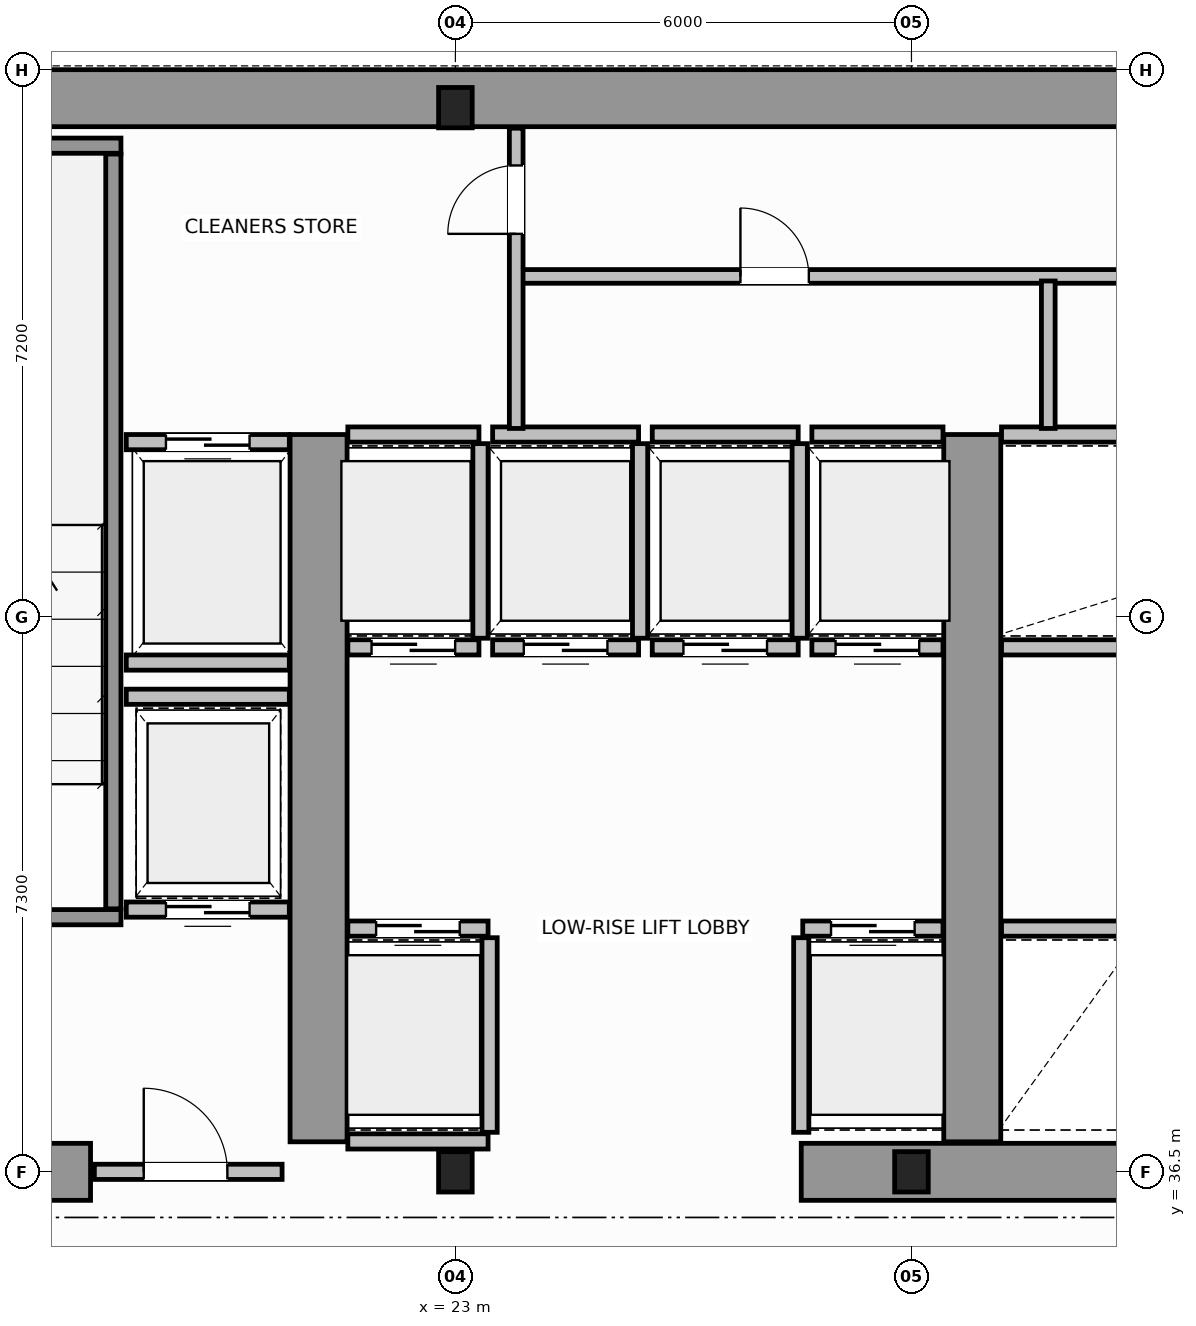
"""IFC4 building model, lengths in metres.
Left out: names, types, materials, properties, quantities, classifications, styles, units other than length and angle.
Written with IfcOpenShell. Run it as: python <this file> out.ifc"""

import sys

from ifc_helpers import new_model, si_unit, direction, frame, frame_2d, origin, origin_2d, place, context, subcontext, project, spatial, rectangle, i_section, extrude, source, transform, mapped, element, fill, save


model = new_model("IFC4")
c1 = context("Model", 3, precision=1e-05, world=origin(), true_north=direction((0.0, 1.0)))
c2 = subcontext(c1, "Body", "Model", "MODEL_VIEW")
j1 = project(units=[si_unit("LENGTHUNIT", "METRE"), si_unit("PLANEANGLEUNIT", "RADIAN")], contexts=[c1])
p1 = place(None, origin())
s1 = spatial("IfcSite", under=j1, at=p1, CompositionType="ELEMENT")
p2 = place(p1, origin())
s2 = spatial("IfcBuilding", under=s1, at=p2, CompositionType="ELEMENT")
p3 = place(p2, frame((0.0, 0.0, 92.0)))
s3 = spatial("IfcBuildingStorey", under=s2, at=p3, CompositionType="ELEMENT", Elevation=92.0)
m1 = source(origin(), c2, "Body", "SweptSolid", [
    extrude(i_section(OverallWidth=0.442, OverallDepth=0.531, WebThickness=0.065, FlangeThickness=0.076, FilletRadius=0.015, at=origin_2d()), origin(), (0.0, 0.0, 1.0), 3.8),
])
for number, where, z_axis, x_axis in (
    (1, (23.0, 36.5, 0.0), (0.0, 0.0, 1.0), (1.0, 0.0, 0.0)),
    (2, (29.0, 36.5, 0.0), (0.0, 0.0, 1.0), (1.0, 0.0, 0.0)),
    (3, (23.0, 50.5, 0.0), (0.0, 0.0, 1.0), (1.0, 0.0, 0.0)),
):
    element("IfcColumn", number, at=place(p3, frame(where, z_axis=z_axis, x_axis=x_axis)), inside=s3, PredefinedType="COLUMN", context=c2, shape_type="MappedRepresentation", body=[
        mapped(m1, transform((0.0, 0.0, 0.0), scale=1.0)),
    ])
p4 = place(p3, frame((14.379, 50.625, 0.0), z_axis=(0.0, 0.0, 1.0), x_axis=(1.0, 0.0, 0.0)))
e4 = element("IfcWall", 4, at=p4, inside=s3, PredefinedType="SHEAR", context=c2, shape_type="SweptSolid", body=[
    extrude(rectangle(XDim=19.619, YDim=0.75, at=frame_2d((9.81, 0.0))), origin(), (0.0, 0.0, 1.0), 3.8),
])
p5 = place(p3, frame((14.395, 36.5, 0.0), z_axis=(0.0, 0.0, 1.0), x_axis=(1.0, 0.0, 0.0)))
e5 = element("IfcWall", 5, at=p5, inside=s3, PredefinedType="SHEAR", context=c2, shape_type="SweptSolid", body=[
    extrude(rectangle(XDim=3.805, YDim=0.75, at=frame_2d((1.902, 0.0))), origin(), (0.0, 0.0, 1.0), 2.38),
])
p6 = place(p3, frame((27.55, 36.5, 0.0), z_axis=(0.0, 0.0, 1.0), x_axis=(1.0, 0.0, 0.0)))
e6 = element("IfcWall", 6, at=p6, inside=s3, PredefinedType="SHEAR", context=c2, shape_type="SweptSolid", body=[
    extrude(rectangle(XDim=4.5, YDim=0.75, at=frame_2d((2.25, 0.0))), origin(), (0.0, 0.0, 1.0), 3.8),
])
for number, where, z_axis, x_axis in (
    (7, (21.2, 36.895, 0.0), (0.0, 0.0, 1.0), (0.0, 1.0, 0.0)),
    (8, (29.8, 36.895, 0.0), (0.0, 0.0, 1.0), (0.0, 1.0, 0.0)),
):
    element("IfcWall", number, at=place(p3, frame(where, z_axis=z_axis, x_axis=x_axis)), inside=s3, PredefinedType="SHEAR", context=c2, shape_type="SweptSolid", body=[
        extrude(rectangle(XDim=9.305, YDim=0.75, at=frame_2d((4.652, 0.0))), origin(), (0.0, 0.0, 1.0), 3.8),
    ])
p7 = place(p3, frame((14.375, 39.85, 0.0), z_axis=(0.0, 0.0, 1.0), x_axis=(1.0, 0.0, 0.0)))
e9 = element("IfcWall", 9, at=p7, inside=s3, PredefinedType="SOLIDWALL", context=c2, shape_type="SweptSolid", body=[
    extrude(rectangle(XDim=4.225, YDim=0.2, at=frame_2d((2.113, 0.0))), origin(), (0.0, 0.0, 1.0), 3.8),
])
p8 = place(p7, frame((1.8, 0.0, 0.0)))
e10 = element("IfcOpeningElement", 10, at=p8, cuts=e9, PredefinedType="OPENING", context=c2, shape_type="SweptSolid", body=[
    extrude(rectangle(XDim=1.1, YDim=2.15, at=frame_2d((0.55, 1.075))), frame((0.0, 0.11, 0.0), z_axis=(0.0, -1.0, 0.0), x_axis=(1.0, 0.0, 0.0)), (0.0, 0.0, 1.0), 0.22),
])
p9 = place(p3, frame((14.375, 50.0, 0.0), z_axis=(0.0, 0.0, 1.0), x_axis=(1.0, 0.0, 0.0)))
e11 = element("IfcWall", 11, at=p9, inside=s3, PredefinedType="SOLIDWALL", context=c2, shape_type="SweptSolid", body=[
    extrude(rectangle(XDim=4.225, YDim=0.2, at=frame_2d((2.113, 0.0))), origin(), (0.0, 0.0, 1.0), 3.8),
])
p10 = place(p3, frame((18.5, 39.96, 0.0), z_axis=(0.0, 0.0, 1.0), x_axis=(0.0, 1.0, 0.0)))
e12 = element("IfcWall", 12, at=p10, inside=s3, PredefinedType="SOLIDWALL", context=c2, shape_type="SweptSolid", body=[
    extrude(rectangle(XDim=9.93, YDim=0.2, at=frame_2d((4.965, 0.0))), origin(), (0.0, 0.0, 1.0), 3.8),
])
p11 = place(p3, frame((18.25, 36.5, 0.0), z_axis=(0.0, 0.0, 1.0), x_axis=(1.0, 0.0, 0.0)))
e13 = element("IfcWall", 13, at=p11, inside=s3, PredefinedType="SOLIDWALL", context=c2, shape_type="SweptSolid", body=[
    extrude(rectangle(XDim=2.47, YDim=0.2, at=frame_2d((1.235, 0.0))), origin(), (0.0, 0.0, 1.0), 2.37),
])
p12 = place(p11, frame((0.65, 0.0, 0.0)))
e14 = element("IfcOpeningElement", 14, at=p12, cuts=e13, PredefinedType="OPENING", context=c2, shape_type="SweptSolid", body=[
    extrude(rectangle(XDim=1.1, YDim=2.15, at=frame_2d((0.55, 1.075))), frame((0.0, 0.11, 0.0), z_axis=(0.0, -1.0, 0.0), x_axis=(1.0, 0.0, 0.0)), (0.0, 0.0, 1.0), 0.22),
])
p13 = place(p3, frame((21.585, 39.7, 0.0), z_axis=(0.0, 0.0, 1.0), x_axis=(1.0, 0.0, 0.0)))
e15 = element("IfcWall", 15, at=p13, inside=s3, PredefinedType="SOLIDWALL", context=c2, shape_type="SweptSolid", body=[
    extrude(rectangle(XDim=1.845, YDim=0.2, at=frame_2d((0.922, 0.0))), origin(), (0.0, 0.0, 1.0), 3.58),
])
p14 = place(p13, frame((0.372, 0.0, 0.0)))
e16 = element("IfcOpeningElement", 16, at=p14, cuts=e15, PredefinedType="OPENING", context=c2, shape_type="SweptSolid", body=[
    extrude(rectangle(XDim=1.1, YDim=2.15, at=frame_2d((0.55, 1.075))), frame((0.0, 0.11, 0.0), z_axis=(0.0, -1.0, 0.0), x_axis=(1.0, 0.0, 0.0)), (0.0, 0.0, 1.0), 0.22),
])
p15 = place(p3, frame((21.585, 36.9, 0.0), z_axis=(0.0, 0.0, 1.0), x_axis=(1.0, 0.0, 0.0)))
e17 = element("IfcWall", 17, at=p15, inside=s3, PredefinedType="SOLIDWALL", context=c2, shape_type="SweptSolid", body=[
    extrude(rectangle(XDim=1.845, YDim=0.2, at=frame_2d((0.922, 0.0))), origin(), (0.0, 0.0, 1.0), 2.37),
])
p16 = place(p3, frame((23.45, 37.02, 0.0), z_axis=(0.0, 0.0, 1.0), x_axis=(0.0, 1.0, 0.0)))
e18 = element("IfcWall", 18, at=p16, inside=s3, PredefinedType="SOLIDWALL", context=c2, shape_type="SweptSolid", body=[
    extrude(rectangle(XDim=2.56, YDim=0.2, at=frame_2d((1.28, 0.0))), origin(), (0.0, 0.0, 1.0), 3.58),
])
p17 = place(p3, frame((27.57, 39.7, 0.0), z_axis=(0.0, 0.0, 1.0), x_axis=(1.0, 0.0, 0.0)))
e19 = element("IfcWall", 19, at=p17, inside=s3, PredefinedType="SOLIDWALL", context=c2, shape_type="SweptSolid", body=[
    extrude(rectangle(XDim=1.845, YDim=0.2, at=frame_2d((0.922, 0.0))), origin(), (0.0, 0.0, 1.0), 3.58),
])
p18 = place(p17, frame((0.372, 0.0, 0.0)))
e20 = element("IfcOpeningElement", 20, at=p18, cuts=e19, PredefinedType="OPENING", context=c2, shape_type="SweptSolid", body=[
    extrude(rectangle(XDim=1.1, YDim=2.15, at=frame_2d((0.55, 1.075))), frame((0.0, 0.11, 0.0), z_axis=(0.0, -1.0, 0.0), x_axis=(1.0, 0.0, 0.0)), (0.0, 0.0, 1.0), 0.22),
])
p19 = place(p3, frame((27.55, 37.02, 0.0), z_axis=(0.0, 0.0, 1.0), x_axis=(0.0, 1.0, 0.0)))
e21 = element("IfcWall", 21, at=p19, inside=s3, PredefinedType="SOLIDWALL", context=c2, shape_type="SweptSolid", body=[
    extrude(rectangle(XDim=2.56, YDim=0.2, at=frame_2d((1.28, 0.0))), origin(), (0.0, 0.0, 1.0), 3.58),
])
p20 = place(p3, frame((21.585, 43.4, 0.0), z_axis=(0.0, 0.0, 1.0), x_axis=(1.0, 0.0, 0.0)))
e22 = element("IfcWall", 22, at=p20, inside=s3, PredefinedType="SOLIDWALL", context=c2, shape_type="SweptSolid", body=[
    extrude(rectangle(XDim=1.725, YDim=0.2, at=frame_2d((0.863, 0.0))), origin(), (0.0, 0.0, 1.0), 3.58),
])
p21 = place(p20, frame((0.312, 0.0, 0.0)))
e23 = element("IfcOpeningElement", 23, at=p21, cuts=e22, PredefinedType="OPENING", context=c2, shape_type="SweptSolid", body=[
    extrude(rectangle(XDim=1.1, YDim=2.15, at=frame_2d((0.55, 1.075))), frame((0.0, 0.11, 0.0), z_axis=(0.0, -1.0, 0.0), x_axis=(1.0, 0.0, 0.0)), (0.0, 0.0, 1.0), 0.22),
])
p22 = place(p3, frame((21.585, 46.2, 0.0), z_axis=(0.0, 0.0, 1.0), x_axis=(1.0, 0.0, 0.0)))
e24 = element("IfcWall", 24, at=p22, inside=s3, PredefinedType="SOLIDWALL", context=c2, shape_type="SweptSolid", body=[
    extrude(rectangle(XDim=1.725, YDim=0.2, at=frame_2d((0.863, 0.0))), origin(), (0.0, 0.0, 1.0), 3.58),
])
p23 = place(p3, frame((23.33, 43.52, 0.0), z_axis=(0.0, 0.0, 1.0), x_axis=(0.0, 1.0, 0.0)))
e25 = element("IfcWall", 25, at=p23, inside=s3, PredefinedType="SOLIDWALL", context=c2, shape_type="SweptSolid", body=[
    extrude(rectangle(XDim=2.56, YDim=0.2, at=frame_2d((1.28, 0.0))), origin(), (0.0, 0.0, 1.0), 3.58),
])
p24 = place(p3, frame((23.49, 43.4, 0.0), z_axis=(0.0, 0.0, 1.0), x_axis=(1.0, 0.0, 0.0)))
e26 = element("IfcWall", 26, at=p24, inside=s3, PredefinedType="SOLIDWALL", context=c2, shape_type="SweptSolid", body=[
    extrude(rectangle(XDim=1.92, YDim=0.2, at=frame_2d((0.96, 0.0))), origin(), (0.0, 0.0, 1.0), 3.58),
])
p25 = place(p24, frame((0.41, 0.0, 0.0)))
e27 = element("IfcOpeningElement", 27, at=p25, cuts=e26, PredefinedType="OPENING", context=c2, shape_type="SweptSolid", body=[
    extrude(rectangle(XDim=1.1, YDim=2.15, at=frame_2d((0.55, 1.075))), frame((0.0, 0.11, 0.0), z_axis=(0.0, -1.0, 0.0), x_axis=(1.0, 0.0, 0.0)), (0.0, 0.0, 1.0), 0.22),
])
p26 = place(p3, frame((23.49, 46.2, 0.0), z_axis=(0.0, 0.0, 1.0), x_axis=(1.0, 0.0, 0.0)))
e28 = element("IfcWall", 28, at=p26, inside=s3, PredefinedType="SOLIDWALL", context=c2, shape_type="SweptSolid", body=[
    extrude(rectangle(XDim=1.92, YDim=0.2, at=frame_2d((0.96, 0.0))), origin(), (0.0, 0.0, 1.0), 3.58),
])
p27 = place(p3, frame((25.43, 43.52, 0.0), z_axis=(0.0, 0.0, 1.0), x_axis=(0.0, 1.0, 0.0)))
e29 = element("IfcWall", 29, at=p27, inside=s3, PredefinedType="SOLIDWALL", context=c2, shape_type="SweptSolid", body=[
    extrude(rectangle(XDim=2.56, YDim=0.2, at=frame_2d((1.28, 0.0))), origin(), (0.0, 0.0, 1.0), 3.58),
])
p28 = place(p3, frame((25.59, 43.4, 0.0), z_axis=(0.0, 0.0, 1.0), x_axis=(1.0, 0.0, 0.0)))
e30 = element("IfcWall", 30, at=p28, inside=s3, PredefinedType="SOLIDWALL", context=c2, shape_type="SweptSolid", body=[
    extrude(rectangle(XDim=1.92, YDim=0.2, at=frame_2d((0.96, 0.0))), origin(), (0.0, 0.0, 1.0), 3.58),
])
p29 = place(p28, frame((0.41, 0.0, 0.0)))
e31 = element("IfcOpeningElement", 31, at=p29, cuts=e30, PredefinedType="OPENING", context=c2, shape_type="SweptSolid", body=[
    extrude(rectangle(XDim=1.1, YDim=2.15, at=frame_2d((0.55, 1.075))), frame((0.0, 0.11, 0.0), z_axis=(0.0, -1.0, 0.0), x_axis=(1.0, 0.0, 0.0)), (0.0, 0.0, 1.0), 0.22),
])
p30 = place(p3, frame((25.59, 46.2, 0.0), z_axis=(0.0, 0.0, 1.0), x_axis=(1.0, 0.0, 0.0)))
e32 = element("IfcWall", 32, at=p30, inside=s3, PredefinedType="SOLIDWALL", context=c2, shape_type="SweptSolid", body=[
    extrude(rectangle(XDim=1.92, YDim=0.2, at=frame_2d((0.96, 0.0))), origin(), (0.0, 0.0, 1.0), 3.58),
])
p31 = place(p3, frame((27.53, 43.52, 0.0), z_axis=(0.0, 0.0, 1.0), x_axis=(0.0, 1.0, 0.0)))
e33 = element("IfcWall", 33, at=p31, inside=s3, PredefinedType="SOLIDWALL", context=c2, shape_type="SweptSolid", body=[
    extrude(rectangle(XDim=2.56, YDim=0.2, at=frame_2d((1.28, 0.0))), origin(), (0.0, 0.0, 1.0), 3.58),
])
p32 = place(p3, frame((27.69, 43.4, 0.0), z_axis=(0.0, 0.0, 1.0), x_axis=(1.0, 0.0, 0.0)))
e34 = element("IfcWall", 34, at=p32, inside=s3, PredefinedType="SOLIDWALL", context=c2, shape_type="SweptSolid", body=[
    extrude(rectangle(XDim=1.725, YDim=0.2, at=frame_2d((0.863, 0.0))), origin(), (0.0, 0.0, 1.0), 3.58),
])
p33 = place(p32, frame((0.312, 0.0, 0.0)))
e35 = element("IfcOpeningElement", 35, at=p33, cuts=e34, PredefinedType="OPENING", context=c2, shape_type="SweptSolid", body=[
    extrude(rectangle(XDim=1.1, YDim=2.15, at=frame_2d((0.55, 1.075))), frame((0.0, 0.11, 0.0), z_axis=(0.0, -1.0, 0.0), x_axis=(1.0, 0.0, 0.0)), (0.0, 0.0, 1.0), 0.22),
])
p34 = place(p3, frame((27.69, 46.2, 0.0), z_axis=(0.0, 0.0, 1.0), x_axis=(1.0, 0.0, 0.0)))
e36 = element("IfcWall", 36, at=p34, inside=s3, PredefinedType="SOLIDWALL", context=c2, shape_type="SweptSolid", body=[
    extrude(rectangle(XDim=1.725, YDim=0.2, at=frame_2d((0.863, 0.0))), origin(), (0.0, 0.0, 1.0), 3.58),
])
p35 = place(p3, frame((30.185, 39.7, 0.0), z_axis=(0.0, 0.0, 1.0), x_axis=(1.0, 0.0, 0.0)))
e37 = element("IfcWall", 37, at=p35, inside=s3, PredefinedType="SOLIDWALL", context=c2, shape_type="SweptSolid", body=[
    extrude(rectangle(XDim=1.845, YDim=0.2, at=frame_2d((0.922, 0.0))), origin(), (0.0, 0.0, 1.0), 3.58),
])
for number, where, z_axis, x_axis in (
    (38, (30.185, 43.4, 0.0), (0.0, 0.0, 1.0), (1.0, 0.0, 0.0)),
    (39, (30.185, 46.2, 0.0), (0.0, 0.0, 1.0), (1.0, 0.0, 0.0)),
):
    element("IfcWall", number, at=place(p3, frame(where, z_axis=z_axis, x_axis=x_axis)), inside=s3, PredefinedType="SOLIDWALL", context=c2, shape_type="SweptSolid", body=[
        extrude(rectangle(XDim=1.725, YDim=0.2, at=frame_2d((0.862, 0.0))), origin(), (0.0, 0.0, 1.0), 3.58),
    ])
p36 = place(p3, frame((18.67, 46.1, 0.0), z_axis=(0.0, 0.0, 1.0), x_axis=(1.0, 0.0, 0.0)))
e40 = element("IfcWall", 40, at=p36, inside=s3, PredefinedType="SOLIDWALL", context=c2, shape_type="SweptSolid", body=[
    extrude(rectangle(XDim=2.145, YDim=0.2, at=frame_2d((1.073, 0.0))), origin(), (0.0, 0.0, 1.0), 3.58),
])
p37 = place(p36, frame((0.522, 0.0, 0.0)))
e41 = element("IfcOpeningElement", 41, at=p37, cuts=e40, PredefinedType="OPENING", context=c2, shape_type="SweptSolid", body=[
    extrude(rectangle(XDim=1.1, YDim=2.15, at=frame_2d((0.55, 1.075))), frame((0.0, 0.11, 0.0), z_axis=(0.0, -1.0, 0.0), x_axis=(1.0, 0.0, 0.0)), (0.0, 0.0, 1.0), 0.22),
])
p38 = place(p3, frame((18.67, 43.2, 0.0), z_axis=(0.0, 0.0, 1.0), x_axis=(1.0, 0.0, 0.0)))
e42 = element("IfcWall", 42, at=p38, inside=s3, PredefinedType="SOLIDWALL", context=c2, shape_type="SweptSolid", body=[
    extrude(rectangle(XDim=2.145, YDim=0.2, at=frame_2d((1.073, 0.0))), origin(), (0.0, 0.0, 1.0), 3.58),
])
p39 = place(p3, frame((18.67, 39.95, 0.0), z_axis=(0.0, 0.0, 1.0), x_axis=(1.0, 0.0, 0.0)))
e43 = element("IfcWall", 43, at=p39, inside=s3, PredefinedType="SOLIDWALL", context=c2, shape_type="SweptSolid", body=[
    extrude(rectangle(XDim=2.145, YDim=0.2, at=frame_2d((1.073, 0.0))), origin(), (0.0, 0.0, 1.0), 3.58),
])
p40 = place(p39, frame((0.522, 0.0, 0.0)))
e44 = element("IfcOpeningElement", 44, at=p40, cuts=e43, PredefinedType="OPENING", context=c2, shape_type="SweptSolid", body=[
    extrude(rectangle(XDim=1.1, YDim=2.15, at=frame_2d((0.55, 1.075))), frame((0.0, 0.11, 0.0), z_axis=(0.0, -1.0, 0.0), x_axis=(1.0, 0.0, 0.0)), (0.0, 0.0, 1.0), 0.22),
])
p41 = place(p3, frame((18.67, 42.75, 0.0), z_axis=(0.0, 0.0, 1.0), x_axis=(1.0, 0.0, 0.0)))
e45 = element("IfcWall", 45, at=p41, inside=s3, PredefinedType="SOLIDWALL", context=c2, shape_type="SweptSolid", body=[
    extrude(rectangle(XDim=2.145, YDim=0.2, at=frame_2d((1.073, 0.0))), origin(), (0.0, 0.0, 1.0), 3.58),
])
p42 = place(p3, frame((23.85, 48.28, 0.0), z_axis=(0.0, 0.0, 1.0), x_axis=(1.0, 0.0, 0.0)))
e46 = element("IfcWall", 46, at=p42, inside=s3, PredefinedType="PLUMBINGWALL", context=c2, shape_type="SweptSolid", body=[
    extrude(rectangle(XDim=15.03, YDim=0.18, at=frame_2d((7.515, 0.0))), origin(), (0.0, 0.0, 1.0), 3.58),
])
p43 = place(p42, frame((2.9, 0.0, 0.0)))
e47 = element("IfcOpeningElement", 47, at=p43, cuts=e46, PredefinedType="OPENING", context=c2, shape_type="SweptSolid", body=[
    extrude(rectangle(XDim=0.9, YDim=2.15, at=frame_2d((0.45, 1.075))), frame((0.0, 0.1, 0.0), z_axis=(0.0, -1.0, 0.0), x_axis=(1.0, 0.0, 0.0)), (0.0, 0.0, 1.0), 0.2),
])
p44 = place(p42, frame((10.4, 0.0, 0.0)))
e48 = element("IfcOpeningElement", 48, at=p44, cuts=e46, PredefinedType="OPENING", context=c2, shape_type="SweptSolid", body=[
    extrude(rectangle(XDim=0.9, YDim=2.15, at=frame_2d((0.45, 1.075))), frame((0.0, 0.1, 0.0), z_axis=(0.0, -1.0, 0.0), x_axis=(1.0, 0.0, 0.0)), (0.0, 0.0, 1.0), 0.2),
])
p45 = place(p3, frame((23.8, 46.28, 0.0), z_axis=(0.0, 0.0, 1.0), x_axis=(0.0, 1.0, 0.0)))
e49 = element("IfcWall", 49, at=p45, inside=s3, PredefinedType="PLUMBINGWALL", context=c2, shape_type="SweptSolid", body=[
    extrude(rectangle(XDim=3.95, YDim=0.18, at=frame_2d((1.975, 0.0))), origin(), (0.0, 0.0, 1.0), 3.58),
])
p46 = place(p45, frame((2.56, 0.0, 0.0)))
e50 = element("IfcOpeningElement", 50, at=p46, cuts=e49, PredefinedType="OPENING", context=c2, shape_type="SweptSolid", body=[
    extrude(rectangle(XDim=0.9, YDim=2.15, at=frame_2d((0.45, 1.075))), frame((0.0, 0.1, 0.0), z_axis=(0.0, -1.0, 0.0), x_axis=(1.0, 0.0, 0.0)), (0.0, 0.0, 1.0), 0.2),
])
p47 = place(p3, frame((30.8, 46.28, 0.0), z_axis=(0.0, 0.0, 1.0), x_axis=(0.0, 1.0, 0.0)))
e51 = element("IfcWall", 51, at=p47, inside=s3, PredefinedType="PLUMBINGWALL", context=c2, shape_type="SweptSolid", body=[
    extrude(rectangle(XDim=1.94, YDim=0.18, at=frame_2d((0.97, 0.0))), origin(), (0.0, 0.0, 1.0), 3.58),
])
m2 = source(origin(), c2, "Body", "SweptSolid", [
    extrude(rectangle(XDim=1.1, YDim=2.15, at=frame_2d((0.55, 1.075))), frame((0.0, 0.025, 0.0), z_axis=(0.0, -1.0, 0.0), x_axis=(1.0, 0.0, 0.0)), (0.0, 0.0, 1.0), 0.05),
])
p48 = place(p12, origin())
e52 = element("IfcDoor", 52, at=p48, inside=s3, OperationType="SINGLE_SWING_RIGHT", PredefinedType="DOOR", context=c2, shape_type="MappedRepresentation", body=[
    mapped(m2, transform((0.0, 0.0, 0.0), scale=1.0)),
])
fill(e14, e52)
p49 = place(p14, origin())
e53 = element("IfcDoor", 53, at=p49, inside=s3, OperationType="DOUBLE_DOOR_SLIDING", PredefinedType="DOOR", context=c2, shape_type="MappedRepresentation", body=[
    mapped(m2, transform((0.0, 0.0, 0.0), scale=1.0)),
])
fill(e16, e53)
p50 = place(p18, origin())
e54 = element("IfcDoor", 54, at=p50, inside=s3, OperationType="DOUBLE_DOOR_SLIDING", PredefinedType="DOOR", context=c2, shape_type="MappedRepresentation", body=[
    mapped(m2, transform((0.0, 0.0, 0.0), scale=1.0)),
])
fill(e20, e54)
p51 = place(p21, origin())
e55 = element("IfcDoor", 55, at=p51, inside=s3, OperationType="DOUBLE_DOOR_SLIDING", PredefinedType="DOOR", context=c2, shape_type="MappedRepresentation", body=[
    mapped(m2, transform((0.0, 0.0, 0.0), scale=1.0)),
])
fill(e23, e55)
p52 = place(p25, origin())
e56 = element("IfcDoor", 56, at=p52, inside=s3, OperationType="DOUBLE_DOOR_SLIDING", PredefinedType="DOOR", context=c2, shape_type="MappedRepresentation", body=[
    mapped(m2, transform((0.0, 0.0, 0.0), scale=1.0)),
])
fill(e27, e56)
p53 = place(p29, origin())
e57 = element("IfcDoor", 57, at=p53, inside=s3, OperationType="DOUBLE_DOOR_SLIDING", PredefinedType="DOOR", context=c2, shape_type="MappedRepresentation", body=[
    mapped(m2, transform((0.0, 0.0, 0.0), scale=1.0)),
])
fill(e31, e57)
p54 = place(p33, origin())
e58 = element("IfcDoor", 58, at=p54, inside=s3, OperationType="DOUBLE_DOOR_SLIDING", PredefinedType="DOOR", context=c2, shape_type="MappedRepresentation", body=[
    mapped(m2, transform((0.0, 0.0, 0.0), scale=1.0)),
])
fill(e35, e58)
p55 = place(p37, origin())
e59 = element("IfcDoor", 59, at=p55, inside=s3, OperationType="DOUBLE_DOOR_SLIDING", PredefinedType="DOOR", context=c2, shape_type="MappedRepresentation", body=[
    mapped(m2, transform((0.0, 0.0, 0.0), scale=1.0)),
])
fill(e41, e59)
p56 = place(p40, origin())
e60 = element("IfcDoor", 60, at=p56, inside=s3, OperationType="DOUBLE_DOOR_SLIDING", PredefinedType="DOOR", context=c2, shape_type="MappedRepresentation", body=[
    mapped(m2, transform((0.0, 0.0, 0.0), scale=1.0)),
])
fill(e44, e60)
m3 = source(origin(), c2, "Body", "SweptSolid", [
    extrude(rectangle(XDim=0.9, YDim=2.15, at=frame_2d((0.45, 1.075))), frame((0.0, 0.025, 0.0), z_axis=(0.0, -1.0, 0.0), x_axis=(1.0, 0.0, 0.0)), (0.0, 0.0, 1.0), 0.05),
])
p57 = place(p46, origin())
e61 = element("IfcDoor", 61, at=p57, inside=s3, OperationType="SINGLE_SWING_LEFT", PredefinedType="DOOR", context=c2, shape_type="MappedRepresentation", body=[
    mapped(m3, transform((0.0, 0.0, 0.0), scale=1.0)),
])
fill(e50, e61)
p58 = place(p43, origin())
e62 = element("IfcDoor", 62, at=p58, inside=s3, OperationType="SINGLE_SWING_RIGHT", PredefinedType="DOOR", context=c2, shape_type="MappedRepresentation", body=[
    mapped(m3, transform((0.0, 0.0, 0.0), scale=1.0)),
])
fill(e47, e62)
save(model, sys.argv[1])
